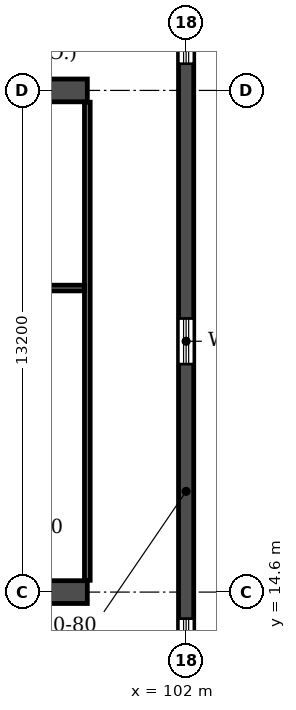
"""IFC4 building model, lengths in metres.
Left out: names, types, materials, properties, quantities, classifications, styles, units other than length and angle.
Written with IfcOpenShell. Run it as: python <this file> out.ifc"""

import sys

from ifc_helpers import new_model, si_unit, direction, frame, frame_2d, origin, place, context, subcontext, project, spatial, rectangle, extrude, element, fill, save


model = new_model("IFC4")
c1 = context("Model", 3, precision=1e-05, world=origin(), true_north=direction((0.0, 1.0)))
c2 = subcontext(c1, "Body", "Model", "MODEL_VIEW")
j1 = project(units=[si_unit("LENGTHUNIT", "METRE"), si_unit("PLANEANGLEUNIT", "RADIAN")], contexts=[c1])
p1 = place(None, origin())
s1 = spatial("IfcSite", under=j1, at=p1, CompositionType="ELEMENT")
p2 = place(p1, origin())
s2 = spatial("IfcBuilding", under=s1, at=p2, CompositionType="ELEMENT")
p3 = place(p2, frame((0.0, 0.0, 23.4)))
s3 = spatial("IfcBuildingStorey", under=s2, at=p3, CompositionType="ELEMENT", Elevation=23.4)
p4 = place(p3, frame((102.0, 4.683, 0.0), z_axis=(0.0, 0.0, 1.0), x_axis=(0.0, 1.0, 0.0)))
e1 = element("IfcWall", 1, at=p4, inside=s3, PredefinedType="SHEAR", context=c2, shape_type="SweptSolid", body=[
    extrude(rectangle(XDim=35.434, YDim=0.4, at=frame_2d((17.717, 0.0))), origin(), (0.0, 0.0, 1.0), 3.05),
])
p5 = place(p4, frame((15.917, 0.0, 0.9)))
e2 = element("IfcOpeningElement", 2, at=p5, cuts=e1, PredefinedType="OPENING", context=c2, shape_type="SweptSolid", body=[
    extrude(rectangle(XDim=1.2, YDim=1.5, at=frame_2d((0.6, 0.75))), frame((0.0, 0.21, 0.0), z_axis=(0.0, -1.0, 0.0), x_axis=(1.0, 0.0, 0.0)), (0.0, 0.0, 1.0), 0.42),
])
p6 = place(p4, frame((23.817, 0.0, 0.9)))
e3 = element("IfcOpeningElement", 3, at=p6, cuts=e1, PredefinedType="OPENING", context=c2, shape_type="SweptSolid", body=[
    extrude(rectangle(XDim=1.2, YDim=1.5, at=frame_2d((0.6, 0.75))), frame((0.0, 0.21, 0.0), z_axis=(0.0, -1.0, 0.0), x_axis=(1.0, 0.0, 0.0)), (0.0, 0.0, 1.0), 0.42),
])
p7 = place(p4, frame((8.017, 0.0, 0.9)))
e4 = element("IfcOpeningElement", 4, at=p7, cuts=e1, PredefinedType="OPENING", context=c2, shape_type="SweptSolid", body=[
    extrude(rectangle(XDim=1.2, YDim=1.5, at=frame_2d((0.6, 0.75))), frame((0.0, 0.21, 0.0), z_axis=(0.0, -1.0, 0.0), x_axis=(1.0, 0.0, 0.0)), (0.0, 0.0, 1.0), 0.42),
])
p8 = place(p4, frame((29.493, 0.0, 0.6)))
e5 = element("IfcOpeningElement", 5, at=p8, cuts=e1, PredefinedType="OPENING", context=c2, shape_type="SweptSolid", body=[
    extrude(rectangle(XDim=2.2, YDim=1.8, at=frame_2d((1.1, 0.9))), frame((0.0, 0.21, 0.0), z_axis=(0.0, -1.0, 0.0), x_axis=(1.0, 0.0, 0.0)), (0.0, 0.0, 1.0), 0.42),
])
p9 = place(p4, frame((2.541, 0.0, 0.6)))
e6 = element("IfcOpeningElement", 6, at=p9, cuts=e1, PredefinedType="OPENING", context=c2, shape_type="SweptSolid", body=[
    extrude(rectangle(XDim=2.2, YDim=1.8, at=frame_2d((1.1, 0.9))), frame((0.0, 0.21, 0.0), z_axis=(0.0, -1.0, 0.0), x_axis=(1.0, 0.0, 0.0)), (0.0, 0.0, 1.0), 0.42),
])
p10 = place(p3, frame((2.6, 14.6, 0.0), z_axis=(0.0, 0.0, 1.0), x_axis=(1.0, 0.0, 0.0)))
e7 = element("IfcWall", 7, at=p10, inside=s3, PredefinedType="SOLIDWALL", context=c2, shape_type="SweptSolid", body=[
    extrude(rectangle(XDim=96.8, YDim=0.6, at=frame_2d((48.4, 0.0))), origin(), (0.0, 0.0, 1.0), 3.05),
])
p11 = place(p10, frame((7.2, 0.0, 0.0)))
e8 = element("IfcOpeningElement", 8, at=p11, cuts=e7, PredefinedType="OPENING", context=c2, shape_type="SweptSolid", body=[
    extrude(rectangle(XDim=1.0, YDim=2.1, at=frame_2d((0.5, 1.05))), frame((0.0, 0.31, 0.0), z_axis=(0.0, -1.0, 0.0), x_axis=(1.0, 0.0, 0.0)), (0.0, 0.0, 1.0), 0.62),
])
p12 = place(p10, frame((16.3, 0.0, 0.0)))
e9 = element("IfcOpeningElement", 9, at=p12, cuts=e7, PredefinedType="OPENING", context=c2, shape_type="SweptSolid", body=[
    extrude(rectangle(XDim=1.0, YDim=2.1, at=frame_2d((0.5, 1.05))), frame((0.0, 0.31, 0.0), z_axis=(0.0, -1.0, 0.0), x_axis=(1.0, 0.0, 0.0)), (0.0, 0.0, 1.0), 0.62),
])
p13 = place(p10, frame((24.2, 0.0, 0.0)))
e10 = element("IfcOpeningElement", 10, at=p13, cuts=e7, PredefinedType="OPENING", context=c2, shape_type="SweptSolid", body=[
    extrude(rectangle(XDim=1.0, YDim=2.1, at=frame_2d((0.5, 1.05))), frame((0.0, 0.31, 0.0), z_axis=(0.0, -1.0, 0.0), x_axis=(1.0, 0.0, 0.0)), (0.0, 0.0, 1.0), 0.62),
])
p14 = place(p10, frame((28.8, 0.0, 0.0)))
e11 = element("IfcOpeningElement", 11, at=p14, cuts=e7, PredefinedType="OPENING", context=c2, shape_type="SweptSolid", body=[
    extrude(rectangle(XDim=1.0, YDim=2.1, at=frame_2d((0.5, 1.05))), frame((0.0, 0.31, 0.0), z_axis=(0.0, -1.0, 0.0), x_axis=(1.0, 0.0, 0.0)), (0.0, 0.0, 1.0), 0.62),
])
p15 = place(p10, frame((40.1, 0.0, 0.0)))
e12 = element("IfcOpeningElement", 12, at=p15, cuts=e7, PredefinedType="OPENING", context=c2, shape_type="SweptSolid", body=[
    extrude(rectangle(XDim=1.0, YDim=2.1, at=frame_2d((0.5, 1.05))), frame((0.0, 0.31, 0.0), z_axis=(0.0, -1.0, 0.0), x_axis=(1.0, 0.0, 0.0)), (0.0, 0.0, 1.0), 0.62),
])
p16 = place(p10, frame((44.0, 0.0, 0.0)))
e13 = element("IfcOpeningElement", 13, at=p16, cuts=e7, PredefinedType="OPENING", context=c2, shape_type="SweptSolid", body=[
    extrude(rectangle(XDim=1.0, YDim=2.1, at=frame_2d((0.5, 1.05))), frame((0.0, 0.31, 0.0), z_axis=(0.0, -1.0, 0.0), x_axis=(1.0, 0.0, 0.0)), (0.0, 0.0, 1.0), 0.62),
])
p17 = place(p10, frame((47.9, 0.0, 0.0)))
e14 = element("IfcOpeningElement", 14, at=p17, cuts=e7, PredefinedType="OPENING", context=c2, shape_type="SweptSolid", body=[
    extrude(rectangle(XDim=1.0, YDim=2.1, at=frame_2d((0.5, 1.05))), frame((0.0, 0.31, 0.0), z_axis=(0.0, -1.0, 0.0), x_axis=(1.0, 0.0, 0.0)), (0.0, 0.0, 1.0), 0.62),
])
p18 = place(p10, frame((53.1, 0.0, 0.0)))
e15 = element("IfcOpeningElement", 15, at=p18, cuts=e7, PredefinedType="OPENING", context=c2, shape_type="SweptSolid", body=[
    extrude(rectangle(XDim=1.0, YDim=2.1, at=frame_2d((0.5, 1.05))), frame((0.0, 0.31, 0.0), z_axis=(0.0, -1.0, 0.0), x_axis=(1.0, 0.0, 0.0)), (0.0, 0.0, 1.0), 0.62),
])
p19 = place(p10, frame((67.0, 0.0, 0.0)))
e16 = element("IfcOpeningElement", 16, at=p19, cuts=e7, PredefinedType="OPENING", context=c2, shape_type="SweptSolid", body=[
    extrude(rectangle(XDim=1.0, YDim=2.1, at=frame_2d((0.5, 1.05))), frame((0.0, 0.31, 0.0), z_axis=(0.0, -1.0, 0.0), x_axis=(1.0, 0.0, 0.0)), (0.0, 0.0, 1.0), 0.62),
])
p20 = place(p10, frame((71.6, 0.0, 0.0)))
e17 = element("IfcOpeningElement", 17, at=p20, cuts=e7, PredefinedType="OPENING", context=c2, shape_type="SweptSolid", body=[
    extrude(rectangle(XDim=1.0, YDim=2.1, at=frame_2d((0.5, 1.05))), frame((0.0, 0.31, 0.0), z_axis=(0.0, -1.0, 0.0), x_axis=(1.0, 0.0, 0.0)), (0.0, 0.0, 1.0), 0.62),
])
p21 = place(p10, frame((79.5, 0.0, 0.0)))
e18 = element("IfcOpeningElement", 18, at=p21, cuts=e7, PredefinedType="OPENING", context=c2, shape_type="SweptSolid", body=[
    extrude(rectangle(XDim=1.0, YDim=2.1, at=frame_2d((0.5, 1.05))), frame((0.0, 0.31, 0.0), z_axis=(0.0, -1.0, 0.0), x_axis=(1.0, 0.0, 0.0)), (0.0, 0.0, 1.0), 0.62),
])
p22 = place(p10, frame((83.15, 0.0, 0.0)))
e19 = element("IfcOpeningElement", 19, at=p22, cuts=e7, PredefinedType="OPENING", context=c2, shape_type="SweptSolid", body=[
    extrude(rectangle(XDim=1.0, YDim=2.1, at=frame_2d((0.5, 1.05))), frame((0.0, 0.31, 0.0), z_axis=(0.0, -1.0, 0.0), x_axis=(1.0, 0.0, 0.0)), (0.0, 0.0, 1.0), 0.62),
])
p23 = place(p10, frame((90.85, 0.0, 0.0)))
e20 = element("IfcOpeningElement", 20, at=p23, cuts=e7, PredefinedType="OPENING", context=c2, shape_type="SweptSolid", body=[
    extrude(rectangle(XDim=1.0, YDim=2.1, at=frame_2d((0.5, 1.05))), frame((0.0, 0.31, 0.0), z_axis=(0.0, -1.0, 0.0), x_axis=(1.0, 0.0, 0.0)), (0.0, 0.0, 1.0), 0.62),
])
p24 = place(p3, frame((2.6, 27.8, 0.0), z_axis=(0.0, 0.0, 1.0), x_axis=(1.0, 0.0, 0.0)))
e21 = element("IfcWall", 21, at=p24, inside=s3, PredefinedType="SOLIDWALL", context=c2, shape_type="SweptSolid", body=[
    extrude(rectangle(XDim=96.8, YDim=0.6, at=frame_2d((48.4, 0.0))), origin(), (0.0, 0.0, 1.0), 3.05),
])
p25 = place(p24, frame((1.8, 0.0, 0.0)))
e22 = element("IfcOpeningElement", 22, at=p25, cuts=e21, PredefinedType="OPENING", context=c2, shape_type="SweptSolid", body=[
    extrude(rectangle(XDim=1.0, YDim=2.1, at=frame_2d((0.5, 1.05))), frame((0.0, 0.31, 0.0), z_axis=(0.0, -1.0, 0.0), x_axis=(1.0, 0.0, 0.0)), (0.0, 0.0, 1.0), 0.62),
])
p26 = place(p24, frame((9.5, 0.0, 0.0)))
e23 = element("IfcOpeningElement", 23, at=p26, cuts=e21, PredefinedType="OPENING", context=c2, shape_type="SweptSolid", body=[
    extrude(rectangle(XDim=1.0, YDim=2.1, at=frame_2d((0.5, 1.05))), frame((0.0, 0.31, 0.0), z_axis=(0.0, -1.0, 0.0), x_axis=(1.0, 0.0, 0.0)), (0.0, 0.0, 1.0), 0.62),
])
p27 = place(p24, frame((16.3, 0.0, 0.0)))
e24 = element("IfcOpeningElement", 24, at=p27, cuts=e21, PredefinedType="OPENING", context=c2, shape_type="SweptSolid", body=[
    extrude(rectangle(XDim=1.0, YDim=2.1, at=frame_2d((0.5, 1.05))), frame((0.0, 0.31, 0.0), z_axis=(0.0, -1.0, 0.0), x_axis=(1.0, 0.0, 0.0)), (0.0, 0.0, 1.0), 0.62),
])
p28 = place(p24, frame((19.65, 0.0, 0.0)))
e25 = element("IfcOpeningElement", 25, at=p28, cuts=e21, PredefinedType="OPENING", context=c2, shape_type="SweptSolid", body=[
    extrude(rectangle(XDim=0.9, YDim=2.1, at=frame_2d((0.45, 1.05))), frame((0.0, 0.31, 0.0), z_axis=(0.0, -1.0, 0.0), x_axis=(1.0, 0.0, 0.0)), (0.0, 0.0, 1.0), 0.62),
])
p29 = place(p24, frame((28.85, 0.0, 0.0)))
e26 = element("IfcOpeningElement", 26, at=p29, cuts=e21, PredefinedType="OPENING", context=c2, shape_type="SweptSolid", body=[
    extrude(rectangle(XDim=0.9, YDim=2.1, at=frame_2d((0.45, 1.05))), frame((0.0, 0.31, 0.0), z_axis=(0.0, -1.0, 0.0), x_axis=(1.0, 0.0, 0.0)), (0.0, 0.0, 1.0), 0.62),
])
p30 = place(p24, frame((32.0, 0.0, 0.0)))
e27 = element("IfcOpeningElement", 27, at=p30, cuts=e21, PredefinedType="OPENING", context=c2, shape_type="SweptSolid", body=[
    extrude(rectangle(XDim=1.0, YDim=2.1, at=frame_2d((0.5, 1.05))), frame((0.0, 0.31, 0.0), z_axis=(0.0, -1.0, 0.0), x_axis=(1.0, 0.0, 0.0)), (0.0, 0.0, 1.0), 0.62),
])
p31 = place(p24, frame((37.2, 0.0, 0.0)))
e28 = element("IfcOpeningElement", 28, at=p31, cuts=e21, PredefinedType="OPENING", context=c2, shape_type="SweptSolid", body=[
    extrude(rectangle(XDim=1.0, YDim=2.1, at=frame_2d((0.5, 1.05))), frame((0.0, 0.31, 0.0), z_axis=(0.0, -1.0, 0.0), x_axis=(1.0, 0.0, 0.0)), (0.0, 0.0, 1.0), 0.62),
])
p32 = place(p24, frame((45.0, 0.0, 0.0)))
e29 = element("IfcOpeningElement", 29, at=p32, cuts=e21, PredefinedType="OPENING", context=c2, shape_type="SweptSolid", body=[
    extrude(rectangle(XDim=1.0, YDim=2.1, at=frame_2d((0.5, 1.05))), frame((0.0, 0.31, 0.0), z_axis=(0.0, -1.0, 0.0), x_axis=(1.0, 0.0, 0.0)), (0.0, 0.0, 1.0), 0.62),
])
p33 = place(p24, frame((47.9, 0.0, 0.0)))
e30 = element("IfcOpeningElement", 30, at=p33, cuts=e21, PredefinedType="OPENING", context=c2, shape_type="SweptSolid", body=[
    extrude(rectangle(XDim=1.0, YDim=2.1, at=frame_2d((0.5, 1.05))), frame((0.0, 0.31, 0.0), z_axis=(0.0, -1.0, 0.0), x_axis=(1.0, 0.0, 0.0)), (0.0, 0.0, 1.0), 0.62),
])
p34 = place(p24, frame((52.1, 0.0, 0.0)))
e31 = element("IfcOpeningElement", 31, at=p34, cuts=e21, PredefinedType="OPENING", context=c2, shape_type="SweptSolid", body=[
    extrude(rectangle(XDim=1.0, YDim=2.1, at=frame_2d((0.5, 1.05))), frame((0.0, 0.31, 0.0), z_axis=(0.0, -1.0, 0.0), x_axis=(1.0, 0.0, 0.0)), (0.0, 0.0, 1.0), 0.62),
])
p35 = place(p24, frame((56.0, 0.0, 0.0)))
e32 = element("IfcOpeningElement", 32, at=p35, cuts=e21, PredefinedType="OPENING", context=c2, shape_type="SweptSolid", body=[
    extrude(rectangle(XDim=1.0, YDim=2.1, at=frame_2d((0.5, 1.05))), frame((0.0, 0.31, 0.0), z_axis=(0.0, -1.0, 0.0), x_axis=(1.0, 0.0, 0.0)), (0.0, 0.0, 1.0), 0.62),
])
p36 = place(p24, frame((58.6, 0.0, 0.0)))
e33 = element("IfcOpeningElement", 33, at=p36, cuts=e21, PredefinedType="OPENING", context=c2, shape_type="SweptSolid", body=[
    extrude(rectangle(XDim=1.0, YDim=2.1, at=frame_2d((0.5, 1.05))), frame((0.0, 0.31, 0.0), z_axis=(0.0, -1.0, 0.0), x_axis=(1.0, 0.0, 0.0)), (0.0, 0.0, 1.0), 0.62),
])
p37 = place(p24, frame((61.2, 0.0, 0.0)))
e34 = element("IfcOpeningElement", 34, at=p37, cuts=e21, PredefinedType="OPENING", context=c2, shape_type="SweptSolid", body=[
    extrude(rectangle(XDim=1.0, YDim=2.1, at=frame_2d((0.5, 1.05))), frame((0.0, 0.31, 0.0), z_axis=(0.0, -1.0, 0.0), x_axis=(1.0, 0.0, 0.0)), (0.0, 0.0, 1.0), 0.62),
])
p38 = place(p24, frame((63.8, 0.0, 0.0)))
e35 = element("IfcOpeningElement", 35, at=p38, cuts=e21, PredefinedType="OPENING", context=c2, shape_type="SweptSolid", body=[
    extrude(rectangle(XDim=1.0, YDim=2.1, at=frame_2d((0.5, 1.05))), frame((0.0, 0.31, 0.0), z_axis=(0.0, -1.0, 0.0), x_axis=(1.0, 0.0, 0.0)), (0.0, 0.0, 1.0), 0.62),
])
p39 = place(p24, frame((67.05, 0.0, 0.0)))
e36 = element("IfcOpeningElement", 36, at=p39, cuts=e21, PredefinedType="OPENING", context=c2, shape_type="SweptSolid", body=[
    extrude(rectangle(XDim=0.9, YDim=2.1, at=frame_2d((0.45, 1.05))), frame((0.0, 0.31, 0.0), z_axis=(0.0, -1.0, 0.0), x_axis=(1.0, 0.0, 0.0)), (0.0, 0.0, 1.0), 0.62),
])
p40 = place(p24, frame((76.25, 0.0, 0.0)))
e37 = element("IfcOpeningElement", 37, at=p40, cuts=e21, PredefinedType="OPENING", context=c2, shape_type="SweptSolid", body=[
    extrude(rectangle(XDim=0.9, YDim=2.1, at=frame_2d((0.45, 1.05))), frame((0.0, 0.31, 0.0), z_axis=(0.0, -1.0, 0.0), x_axis=(1.0, 0.0, 0.0)), (0.0, 0.0, 1.0), 0.62),
])
p41 = place(p24, frame((79.5, 0.0, 0.0)))
e38 = element("IfcOpeningElement", 38, at=p41, cuts=e21, PredefinedType="OPENING", context=c2, shape_type="SweptSolid", body=[
    extrude(rectangle(XDim=1.0, YDim=2.1, at=frame_2d((0.5, 1.05))), frame((0.0, 0.31, 0.0), z_axis=(0.0, -1.0, 0.0), x_axis=(1.0, 0.0, 0.0)), (0.0, 0.0, 1.0), 0.62),
])
p42 = place(p24, frame((88.6, 0.0, 0.0)))
e39 = element("IfcOpeningElement", 39, at=p42, cuts=e21, PredefinedType="OPENING", context=c2, shape_type="SweptSolid", body=[
    extrude(rectangle(XDim=1.0, YDim=2.1, at=frame_2d((0.5, 1.05))), frame((0.0, 0.31, 0.0), z_axis=(0.0, -1.0, 0.0), x_axis=(1.0, 0.0, 0.0)), (0.0, 0.0, 1.0), 0.62),
])
p43 = place(p3, frame((99.4, 14.91, 0.0), z_axis=(0.0, 0.0, 1.0), x_axis=(0.0, 1.0, 0.0)))
e40 = element("IfcWall", 40, at=p43, inside=s3, PredefinedType="PARTITIONING", context=c2, shape_type="SweptSolid", body=[
    extrude(rectangle(XDim=12.58, YDim=0.15, at=frame_2d((6.29, 0.0))), origin(), (0.0, 0.0, 1.0), 3.05),
])
p44 = place(p3, frame((84.075, 22.6, 0.0), z_axis=(0.0, 0.0, 1.0), x_axis=(1.0, 0.0, 0.0)))
e41 = element("IfcWall", 41, at=p44, inside=s3, PredefinedType="PARTITIONING", context=c2, shape_type="SweptSolid", body=[
    extrude(rectangle(XDim=15.25, YDim=0.15, at=frame_2d((7.625, 0.0))), origin(), (0.0, 0.0, 1.0), 3.05),
])
p45 = place(p5, origin())
e42 = element("IfcWindow", 42, at=p45, inside=s3, PartitioningType="SINGLE_PANEL", PredefinedType="WINDOW", context=c2, shape_type="SweptSolid", body=[
    extrude(rectangle(XDim=1.2, YDim=1.5, at=frame_2d((0.6, 0.75))), frame((0.0, 0.03, 0.0), z_axis=(0.0, -1.0, 0.0), x_axis=(1.0, 0.0, 0.0)), (0.0, 0.0, 1.0), 0.06),
])
fill(e2, e42)
p46 = place(p6, origin())
e43 = element("IfcWindow", 43, at=p46, inside=s3, PartitioningType="SINGLE_PANEL", PredefinedType="WINDOW", context=c2, shape_type="SweptSolid", body=[
    extrude(rectangle(XDim=1.2, YDim=1.5, at=frame_2d((0.6, 0.75))), frame((0.0, 0.03, 0.0), z_axis=(0.0, -1.0, 0.0), x_axis=(1.0, 0.0, 0.0)), (0.0, 0.0, 1.0), 0.06),
])
fill(e3, e43)
p47 = place(p7, origin())
e44 = element("IfcWindow", 44, at=p47, inside=s3, PartitioningType="SINGLE_PANEL", PredefinedType="WINDOW", context=c2, shape_type="SweptSolid", body=[
    extrude(rectangle(XDim=1.2, YDim=1.5, at=frame_2d((0.6, 0.75))), frame((0.0, 0.03, 0.0), z_axis=(0.0, -1.0, 0.0), x_axis=(1.0, 0.0, 0.0)), (0.0, 0.0, 1.0), 0.06),
])
fill(e4, e44)
save(model, sys.argv[1])
